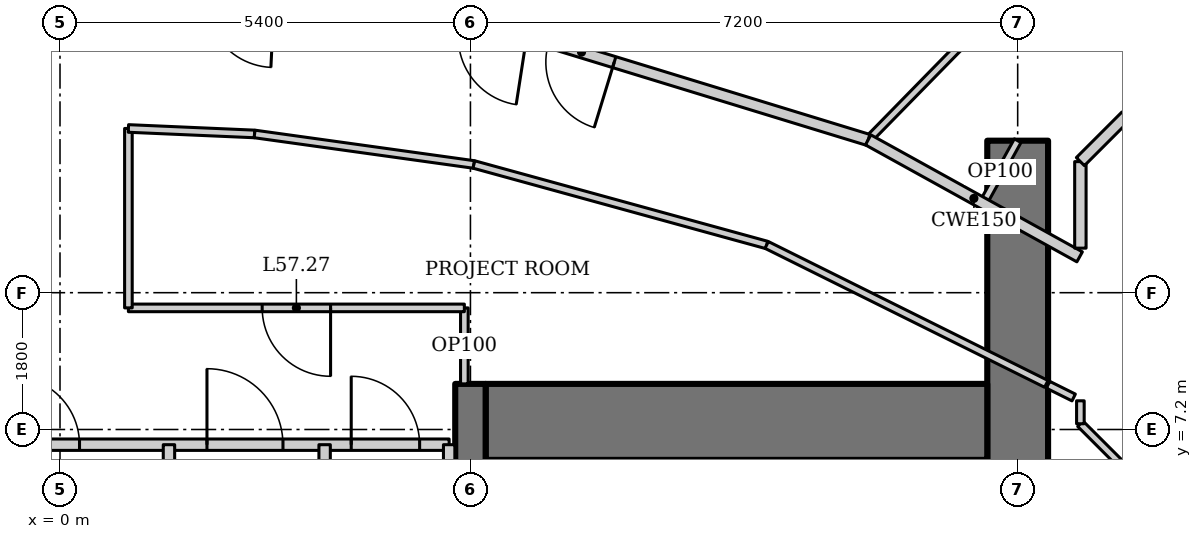
"""IFC4 building model, lengths in metres.
Left out: names, types, materials, properties, quantities, classifications, styles, units other than length and angle.
Written with IfcOpenShell. Run it as: python <this file> out.ifc"""

import sys

from ifc_helpers import new_model, si_unit, direction, frame, frame_2d, origin, place, context, subcontext, project, spatial, rectangle, extrude, element, fill, save


model = new_model("IFC4")
c1 = context("Model", 3, precision=1e-05, world=origin(), true_north=direction((0.0, 1.0)))
c2 = subcontext(c1, "Body", "Model", "MODEL_VIEW")
j1 = project(units=[si_unit("LENGTHUNIT", "METRE"), si_unit("PLANEANGLEUNIT", "RADIAN")], contexts=[c1])
p1 = place(None, origin())
s1 = spatial("IfcSite", under=j1, at=p1, CompositionType="ELEMENT")
p2 = place(p1, origin())
s2 = spatial("IfcBuilding", under=s1, at=p2, CompositionType="ELEMENT")
p3 = place(p2, frame((0.0, 0.0, 245.2)))
s3 = spatial("IfcBuildingStorey", under=s2, at=p3, CompositionType="ELEMENT", Elevation=245.2)
p4 = place(p3, frame((12.6, -11.0, 0.0), z_axis=(0.0, 0.0, 1.0), x_axis=(0.0, 1.0, 0.0)))
e1 = element("IfcWall", 1, at=p4, inside=s3, PredefinedType="SHEAR", context=c2, shape_type="SweptSolid", body=[
    extrude(rectangle(XDim=22.0, YDim=0.8, at=frame_2d((11.0, 0.0))), origin(), (0.0, 0.0, 1.0), 4.2),
])
p5 = place(p4, frame((10.1, 0.0, 0.0)))
e2 = element("IfcOpeningElement", 2, at=p5, cuts=e1, PredefinedType="OPENING", context=c2, shape_type="SweptSolid", body=[
    extrude(rectangle(XDim=1.8, YDim=2.1, at=frame_2d((0.9, 1.05))), frame((0.0, 0.41, 0.0), z_axis=(0.0, -1.0, 0.0), x_axis=(1.0, 0.0, 0.0)), (0.0, 0.0, 1.0), 0.82),
])
p6 = place(p3, frame((12.2, 7.3, 0.0), z_axis=(0.0, 0.0, 1.0), x_axis=(-1.0, 0.0, 0.0)))
e3 = element("IfcWall", 3, at=p6, inside=s3, PredefinedType="SHEAR", context=c2, shape_type="SweptSolid", body=[
    extrude(rectangle(XDim=6.6, YDim=1.0, at=frame_2d((3.3, 0.0))), origin(), (0.0, 0.0, 1.0), 4.2),
])
p7 = place(p3, frame((5.4, -6.8, 0.0), z_axis=(0.0, 0.0, 1.0), x_axis=(0.0, 1.0, 0.0)))
e4 = element("IfcWall", 4, at=p7, inside=s3, PredefinedType="SHEAR", context=c2, shape_type="SweptSolid", body=[
    extrude(rectangle(XDim=14.6, YDim=0.4, at=frame_2d((7.3, 0.0))), origin(), (0.0, 0.0, 1.0), 4.2),
])
p8 = place(p7, frame((5.9, 0.0, 0.0)))
e5 = element("IfcOpeningElement", 5, at=p8, cuts=e4, PredefinedType="OPENING", context=c2, shape_type="SweptSolid", body=[
    extrude(rectangle(XDim=1.8, YDim=2.1, at=frame_2d((0.9, 1.05))), frame((0.0, 0.21, 0.0), z_axis=(0.0, -1.0, 0.0), x_axis=(1.0, 0.0, 0.0)), (0.0, 0.0, 1.0), 0.42),
])
p9 = place(p3, frame((15.709, 16.199, 0.0), z_axis=(0.0, 0.0, 1.0), x_axis=(-0.699362525935, -0.714767135029, 0.0)))
e6 = element("IfcWall", 6, at=p9, inside=s3, PredefinedType="PARTITIONING", context=c2, shape_type="SweptSolid", body=[
    extrude(rectangle(XDim=7.259, YDim=0.1, at=frame_2d((3.629, 0.0))), origin(), (0.0, 0.0, 1.0), 3.41),
])
p10 = place(p3, frame((10.633, 11.01, 0.0), z_axis=(0.0, 0.0, 1.0), x_axis=(-0.956185837153, 0.292760388079, 0.0)))
e7 = element("IfcWall", 7, at=p10, inside=s3, PredefinedType="PARTITIONING", context=c2, shape_type="SweptSolid", body=[
    extrude(rectangle(XDim=4.544, YDim=0.15, at=frame_2d((2.272, 0.0))), origin(), (0.0, 0.0, 1.0), 4.05),
])
p11 = place(p10, frame((3.494, 0.0, 0.0)))
e8 = element("IfcOpeningElement", 8, at=p11, cuts=e7, PredefinedType="OPENING", context=c2, shape_type="SweptSolid", body=[
    extrude(rectangle(XDim=0.9, YDim=2.1, at=frame_2d((0.45, 1.05))), frame((0.0, 0.085, 0.0), z_axis=(0.0, -1.0, 0.0), x_axis=(1.0, 0.0, 0.0)), (0.0, 0.0, 1.0), 0.17),
])
p12 = place(p3, frame((-5.12, 7.0, 0.0), z_axis=(0.0, 0.0, 1.0), x_axis=(1.0, 0.0, 0.0)))
e9 = element("IfcWall", 9, at=p12, inside=s3, PredefinedType="SOLIDWALL", context=c2, shape_type="SweptSolid", body=[
    extrude(rectangle(XDim=10.24, YDim=0.15, at=frame_2d((5.12, 0.0))), origin(), (0.0, 0.0, 1.0), 4.05),
])
p13 = place(p12, frame((1.2, 0.0, 0.0)))
e10 = element("IfcOpeningElement", 10, at=p13, cuts=e9, PredefinedType="OPENING", context=c2, shape_type="SweptSolid", body=[
    extrude(rectangle(XDim=0.9, YDim=2.1, at=frame_2d((0.45, 1.05))), frame((0.0, 0.085, 0.0), z_axis=(0.0, -1.0, 0.0), x_axis=(1.0, 0.0, 0.0)), (0.0, 0.0, 1.0), 0.17),
])
p14 = place(p12, frame((4.477, 0.0, 0.0)))
e11 = element("IfcOpeningElement", 11, at=p14, cuts=e9, PredefinedType="OPENING", context=c2, shape_type="SweptSolid", body=[
    extrude(rectangle(XDim=0.9, YDim=2.1, at=frame_2d((0.45, 1.05))), frame((0.0, 0.085, 0.0), z_axis=(0.0, -1.0, 0.0), x_axis=(1.0, 0.0, 0.0)), (0.0, 0.0, 1.0), 0.17),
])
p15 = place(p12, frame((7.054, 0.0, 0.0)))
e12 = element("IfcOpeningElement", 12, at=p15, cuts=e9, PredefinedType="OPENING", context=c2, shape_type="SweptSolid", body=[
    extrude(rectangle(XDim=1.0, YDim=2.1, at=frame_2d((0.5, 1.05))), frame((0.0, 0.085, 0.0), z_axis=(0.0, -1.0, 0.0), x_axis=(1.0, 0.0, 0.0)), (0.0, 0.0, 1.0), 0.17),
])
p16 = place(p12, frame((8.952, 0.0, 0.0)))
e13 = element("IfcOpeningElement", 13, at=p16, cuts=e9, PredefinedType="OPENING", context=c2, shape_type="SweptSolid", body=[
    extrude(rectangle(XDim=0.9, YDim=2.1, at=frame_2d((0.45, 1.05))), frame((0.0, 0.085, 0.0), z_axis=(0.0, -1.0, 0.0), x_axis=(1.0, 0.0, 0.0)), (0.0, 0.0, 1.0), 0.17),
])
p17 = place(p3, frame((5.12, 2.6, 0.0), z_axis=(0.0, 0.0, 1.0), x_axis=(0.0, 1.0, 0.0)))
e14 = element("IfcWall", 14, at=p17, inside=s3, PredefinedType="SOLIDWALL", context=c2, shape_type="SweptSolid", body=[
    extrude(rectangle(XDim=4.4, YDim=0.15, at=frame_2d((2.2, 0.0))), origin(), (0.0, 0.0, 1.0), 4.05),
])
p18 = place(p3, frame((1.434, 2.6, 0.0), z_axis=(0.0, 0.0, 1.0), x_axis=(0.0, 1.0, 0.0)))
e15 = element("IfcWall", 15, at=p18, inside=s3, PredefinedType="SOLIDWALL", context=c2, shape_type="SweptSolid", body=[
    extrude(rectangle(XDim=4.4, YDim=0.15, at=frame_2d((2.2, 0.0))), origin(), (0.0, 0.0, 1.0), 3.108),
])
p19 = place(p3, frame((3.482, 2.6, 0.0), z_axis=(0.0, 0.0, 1.0), x_axis=(0.0, 1.0, 0.0)))
e16 = element("IfcWall", 16, at=p19, inside=s3, PredefinedType="SOLIDWALL", context=c2, shape_type="SweptSolid", body=[
    extrude(rectangle(XDim=4.4, YDim=0.15, at=frame_2d((2.2, 0.0))), origin(), (0.0, 0.0, 1.0), 4.05),
])
p20 = place(p3, frame((13.0, 7.788, 0.0), z_axis=(0.0, 0.0, 1.0), x_axis=(0.895721570004, -0.444615416995, 0.0)))
e17 = element("IfcWall", 17, at=p20, inside=s3, PredefinedType="PARTITIONING", context=c2, shape_type="SweptSolid", body=[
    extrude(rectangle(XDim=0.376, YDim=0.1, at=frame_2d((0.188, 0.0))), origin(), (0.0, 0.0, 1.0), 4.05),
])
p21 = place(p3, frame((5.32, 7.8, 0.0), z_axis=(0.0, 0.0, 1.0), x_axis=(0.0, 1.0, 0.0)))
e18 = element("IfcWall", 18, at=p21, inside=s3, PredefinedType="PARTITIONING", context=c2, shape_type="SweptSolid", body=[
    extrude(rectangle(XDim=1.0, YDim=0.1, at=frame_2d((0.5, 0.0))), origin(), (0.0, 0.0, 1.0), 4.05),
])
p22 = place(p3, frame((5.32, 8.8, 0.0), z_axis=(0.0, 0.0, 1.0), x_axis=(-1.0, 0.0, 0.0)))
e19 = element("IfcWall", 19, at=p22, inside=s3, PredefinedType="PARTITIONING", context=c2, shape_type="SweptSolid", body=[
    extrude(rectangle(XDim=4.42, YDim=0.1, at=frame_2d((2.21, 0.0))), origin(), (0.0, 0.0, 1.0), 4.05),
])
p23 = place(p22, frame((1.76, 0.0, 0.0)))
e20 = element("IfcOpeningElement", 20, at=p23, cuts=e19, PredefinedType="OPENING", context=c2, shape_type="SweptSolid", body=[
    extrude(rectangle(XDim=0.9, YDim=2.1, at=frame_2d((0.45, 1.05))), frame((0.0, 0.06, 0.0), z_axis=(0.0, -1.0, 0.0), x_axis=(1.0, 0.0, 0.0)), (0.0, 0.0, 1.0), 0.12),
])
p24 = place(p3, frame((0.9, 8.8, 0.0), z_axis=(0.0, 0.0, 1.0), x_axis=(0.0, 1.0, 0.0)))
e21 = element("IfcWall", 21, at=p24, inside=s3, PredefinedType="PARTITIONING", context=c2, shape_type="SweptSolid", body=[
    extrude(rectangle(XDim=2.361, YDim=0.1, at=frame_2d((1.18, 0.0))), origin(), (0.0, 0.0, 1.0), 4.05),
])
p25 = place(p3, frame((0.9, 11.161, 0.0), z_axis=(0.0, 0.0, 1.0), x_axis=(0.999053939397, -0.043488230303, 0.0)))
e22 = element("IfcWall", 22, at=p25, inside=s3, PredefinedType="PARTITIONING", context=c2, shape_type="SweptSolid", body=[
    extrude(rectangle(XDim=1.662, YDim=0.1, at=frame_2d((0.831, 0.0))), origin(), (0.0, 0.0, 1.0), 4.05),
])
p26 = place(p3, frame((2.56, 11.089, 0.0), z_axis=(0.0, 0.0, 1.0), x_axis=(0.99045099049, -0.137865280027, 0.0)))
e23 = element("IfcWall", 23, at=p26, inside=s3, PredefinedType="PARTITIONING", context=c2, shape_type="SweptSolid", body=[
    extrude(rectangle(XDim=2.913, YDim=0.1, at=frame_2d((1.457, 0.0))), origin(), (0.0, 0.0, 1.0), 4.05),
])
p27 = place(p3, frame((5.445, 10.687, 0.0), z_axis=(0.0, 0.0, 1.0), x_axis=(0.964244438722, -0.265014456954, 0.0)))
e24 = element("IfcWall", 24, at=p27, inside=s3, PredefinedType="PARTITIONING", context=c2, shape_type="SweptSolid", body=[
    extrude(rectangle(XDim=3.995, YDim=0.1, at=frame_2d((1.998, 0.0))), origin(), (0.0, 0.0, 1.0), 4.05),
])
p28 = place(p3, frame((9.298, 9.628, 0.0), z_axis=(0.0, 0.0, 1.0), x_axis=(0.895529831139, -0.445001484874, 0.0)))
e25 = element("IfcWall", 25, at=p28, inside=s3, PredefinedType="PARTITIONING", context=c2, shape_type="SweptSolid", body=[
    extrude(rectangle(XDim=4.108, YDim=0.1, at=frame_2d((2.054, 0.0))), origin(), (0.0, 0.0, 1.0), 4.05),
])
p29 = place(p3, frame((12.6, 11.0, 0.0), z_axis=(0.0, 0.0, 1.0), x_axis=(-0.484103558985, -0.875010710893, 0.0)))
e26 = element("IfcWall", 26, at=p29, inside=s3, PredefinedType="PARTITIONING", context=c2, shape_type="SweptSolid", body=[
    extrude(rectangle(XDim=0.943, YDim=0.1, at=frame_2d((0.472, 0.0))), origin(), (0.0, 0.0, 1.0), 4.05),
])
p30 = place(p3, frame((13.415, 9.472, 0.0), z_axis=(0.0, 0.0, 1.0), x_axis=(-0.875072100837, 0.483992580869, 0.0)))
e27 = element("IfcWall", 27, at=p30, inside=s3, PredefinedType="PARTITIONING", context=c2, shape_type="SweptSolid", body=[
    extrude(rectangle(XDim=3.179, YDim=0.15, at=frame_2d((1.59, 0.0))), origin(), (0.0, 0.0, 1.0), 4.05),
])
p31 = place(p3, frame((14.025, 6.675, 0.0), z_axis=(0.0, 0.0, 1.0), x_axis=(-0.707106781187, 0.707106781187, 0.0)))
e28 = element("IfcWall", 28, at=p31, inside=s3, PredefinedType="PARTITIONING", context=c2, shape_type="SweptSolid", body=[
    extrude(rectangle(XDim=0.849, YDim=0.1, at=frame_2d((0.425, 0.0))), origin(), (0.0, 0.0, 1.0), 4.05),
])
p32 = place(p3, frame((13.425, 7.275, 0.0), z_axis=(0.0, 0.0, 1.0), x_axis=(0.0, 1.0, 0.0)))
e29 = element("IfcWall", 29, at=p32, inside=s3, PredefinedType="PARTITIONING", context=c2, shape_type="SweptSolid", body=[
    extrude(rectangle(XDim=0.302, YDim=0.1, at=frame_2d((0.151, 0.0))), origin(), (0.0, 0.0, 1.0), 4.05),
])
p33 = place(p3, frame((13.425, 9.586, 0.0), z_axis=(0.0, 0.0, 1.0), x_axis=(0.0, 1.0, 0.0)))
e30 = element("IfcWall", 30, at=p33, inside=s3, PredefinedType="PARTITIONING", context=c2, shape_type="SweptSolid", body=[
    extrude(rectangle(XDim=1.138, YDim=0.15, at=frame_2d((0.569, 0.0))), origin(), (0.0, 0.0, 1.0), 4.05),
])
p34 = place(p3, frame((13.425, 10.725, 0.0), z_axis=(0.0, 0.0, 1.0), x_axis=(0.707106781187, 0.707106781187, 0.0)))
e31 = element("IfcWall", 31, at=p34, inside=s3, PredefinedType="PARTITIONING", context=c2, shape_type="SweptSolid", body=[
    extrude(rectangle(XDim=0.849, YDim=0.15, at=frame_2d((0.425, 0.0))), origin(), (0.0, 0.0, 1.0), 4.05),
])
p35 = place(p14, origin())
e32 = element("IfcDoor", 32, at=p35, inside=s3, OperationType="SINGLE_SWING_LEFT", PredefinedType="DOOR", context=c2, shape_type="SweptSolid", body=[
    extrude(rectangle(XDim=0.9, YDim=2.1, at=frame_2d((0.45, 1.05))), frame((0.0, 0.025, 0.0), z_axis=(0.0, -1.0, 0.0), x_axis=(1.0, 0.0, 0.0)), (0.0, 0.0, 1.0), 0.05),
])
fill(e11, e32)
p36 = place(p15, origin())
e33 = element("IfcDoor", 33, at=p36, inside=s3, OperationType="SINGLE_SWING_LEFT", PredefinedType="DOOR", context=c2, shape_type="SweptSolid", body=[
    extrude(rectangle(XDim=1.0, YDim=2.1, at=frame_2d((0.5, 1.05))), frame((0.0, 0.025, 0.0), z_axis=(0.0, -1.0, 0.0), x_axis=(1.0, 0.0, 0.0)), (0.0, 0.0, 1.0), 0.05),
])
fill(e12, e33)
p37 = place(p16, origin())
e34 = element("IfcDoor", 34, at=p37, inside=s3, OperationType="SINGLE_SWING_LEFT", PredefinedType="DOOR", context=c2, shape_type="SweptSolid", body=[
    extrude(rectangle(XDim=0.9, YDim=2.1, at=frame_2d((0.45, 1.05))), frame((0.0, 0.025, 0.0), z_axis=(0.0, -1.0, 0.0), x_axis=(1.0, 0.0, 0.0)), (0.0, 0.0, 1.0), 0.05),
])
fill(e13, e34)
p38 = place(p23, origin())
e35 = element("IfcDoor", 35, at=p38, inside=s3, OperationType="SINGLE_SWING_LEFT", PredefinedType="DOOR", context=c2, shape_type="SweptSolid", body=[
    extrude(rectangle(XDim=0.9, YDim=2.1, at=frame_2d((0.45, 1.05))), frame((0.0, 0.025, 0.0), z_axis=(0.0, -1.0, 0.0), x_axis=(1.0, 0.0, 0.0)), (0.0, 0.0, 1.0), 0.05),
])
fill(e20, e35)
p39 = place(p11, origin())
e36 = element("IfcDoor", 36, at=p39, inside=s3, OperationType="SINGLE_SWING_LEFT", PredefinedType="DOOR", context=c2, shape_type="SweptSolid", body=[
    extrude(rectangle(XDim=0.9, YDim=2.1, at=frame_2d((0.45, 1.05))), frame((0.0, 0.025, 0.0), z_axis=(0.0, -1.0, 0.0), x_axis=(1.0, 0.0, 0.0)), (0.0, 0.0, 1.0), 0.05),
])
fill(e8, e36)
save(model, sys.argv[1])
